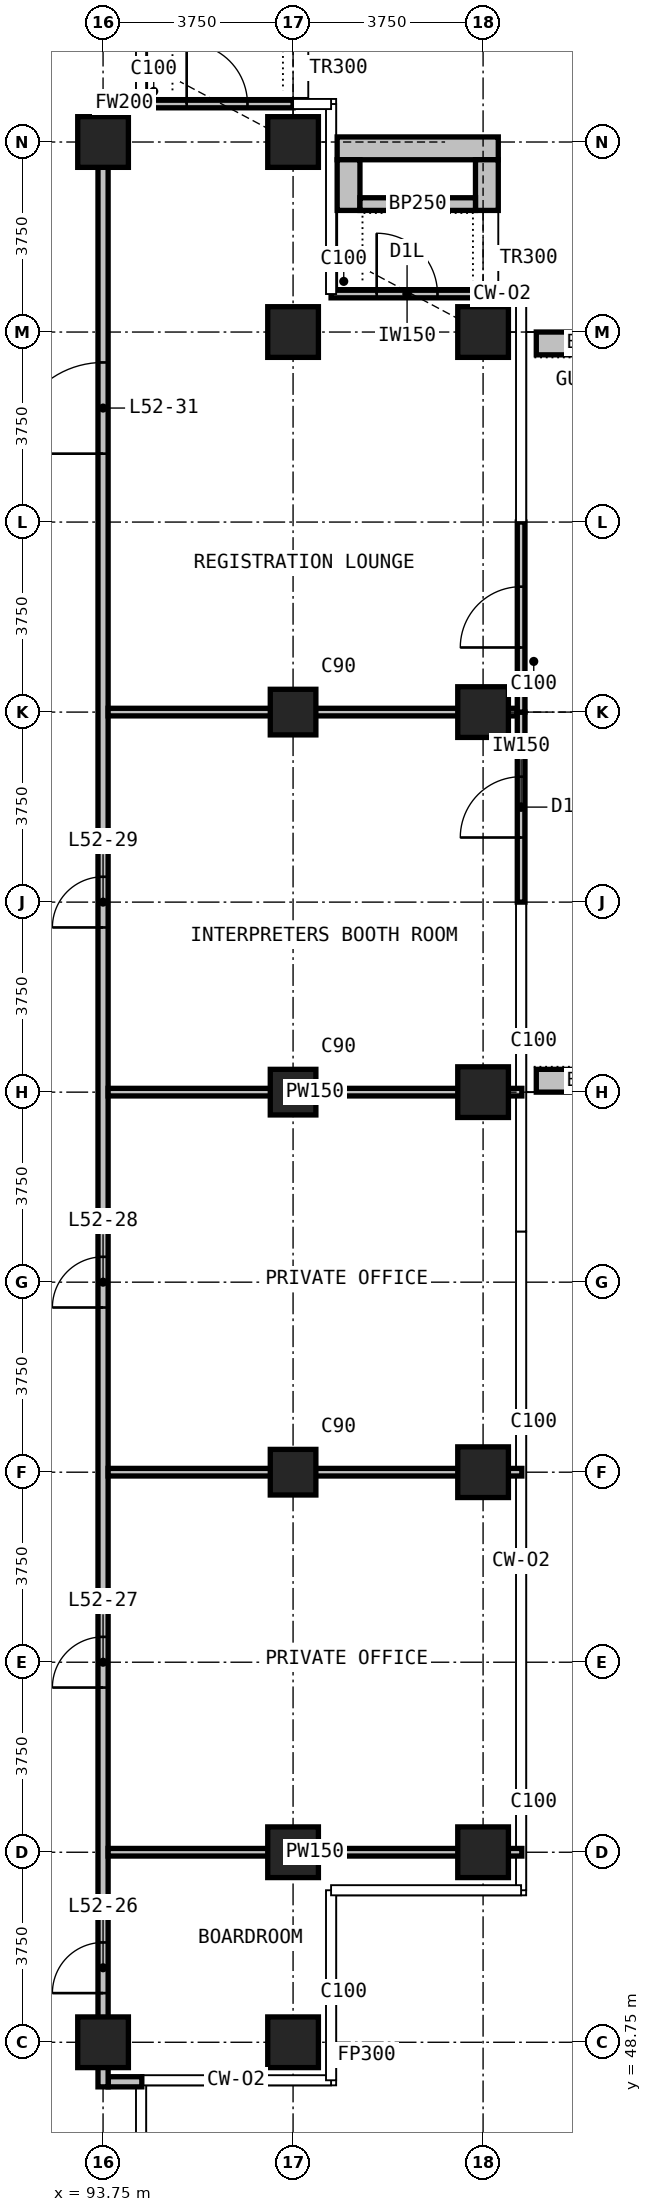
"""IFC4 building model, lengths in metres.
Left out: names, types, materials, properties, quantities, classifications, styles, units other than length and angle.
Written with IfcOpenShell. Run it as: python <this file> out.ifc"""

import sys

from ifc_helpers import new_model, si_unit, direction, frame, frame_2d, origin, origin_2d, place, context, subcontext, project, spatial, rectangle, extrude, element, fill, save


model = new_model("IFC4")
c1 = context("Model", 3, precision=1e-05, world=origin(), true_north=direction((0.0, 1.0)))
c2 = subcontext(c1, "Body", "Model", "MODEL_VIEW")
j1 = project(units=[si_unit("LENGTHUNIT", "METRE"), si_unit("PLANEANGLEUNIT", "RADIAN")], contexts=[c1])
p1 = place(None, origin())
s1 = spatial("IfcSite", under=j1, at=p1, CompositionType="ELEMENT")
p2 = place(p1, origin())
s2 = spatial("IfcBuilding", under=s1, at=p2, CompositionType="ELEMENT")
p3 = place(p2, frame((0.0, 0.0, 203.1)))
s3 = spatial("IfcBuildingStorey", under=s2, at=p3, CompositionType="ELEMENT", Elevation=203.1)
for number, where, z_axis, x_axis in (
    (1, (93.75, 48.75, 0.0), (0.0, 0.0, 1.0), (1.0, 0.0, 0.0)),
    (2, (93.75, 86.25, 0.0), (0.0, 0.0, 1.0), (1.0, 0.0, 0.0)),
    (3, (97.5, 48.75, 0.0), (0.0, 0.0, 1.0), (1.0, 0.0, 0.0)),
    (4, (97.5, 52.5, 0.0), (0.0, 0.0, 1.0), (1.0, 0.0, 0.0)),
):
    element("IfcColumn", number, at=place(p3, frame(where, z_axis=z_axis, x_axis=x_axis)), inside=s3, PredefinedType="COLUMN", context=c2, shape_type="SweptSolid", body=[
        extrude(rectangle(XDim=1.0, YDim=1.0, at=origin_2d()), origin(), (0.0, 0.0, 1.0), 3.6),
    ])
for number, where, z_axis, x_axis in (
    (5, (97.5, 60.0, 0.0), (0.0, 0.0, 1.0), (1.0, 0.0, 0.0)),
    (6, (97.5, 67.5, 0.0), (0.0, 0.0, 1.0), (1.0, 0.0, 0.0)),
    (7, (97.5, 75.0, 0.0), (0.0, 0.0, 1.0), (1.0, 0.0, 0.0)),
):
    element("IfcColumn", number, at=place(p3, frame(where, z_axis=z_axis, x_axis=x_axis)), inside=s3, PredefinedType="COLUMN", context=c2, shape_type="SweptSolid", body=[
        extrude(rectangle(XDim=0.9, YDim=0.9, at=origin_2d()), origin(), (0.0, 0.0, 1.0), 3.6),
    ])
for number, where, z_axis, x_axis in (
    (8, (97.5, 82.5, 0.0), (0.0, 0.0, 1.0), (1.0, 0.0, 0.0)),
    (9, (97.5, 86.25, 0.0), (0.0, 0.0, 1.0), (1.0, 0.0, 0.0)),
    (10, (101.25, 52.5, 0.0), (0.0, 0.0, 1.0), (1.0, 0.0, 0.0)),
    (11, (101.25, 60.0, 0.0), (0.0, 0.0, 1.0), (1.0, 0.0, 0.0)),
    (12, (101.25, 67.5, 0.0), (0.0, 0.0, 1.0), (1.0, 0.0, 0.0)),
    (13, (101.25, 75.0, 0.0), (0.0, 0.0, 1.0), (1.0, 0.0, 0.0)),
    (14, (101.25, 82.5, 0.0), (0.0, 0.0, 1.0), (1.0, 0.0, 0.0)),
):
    element("IfcColumn", number, at=place(p3, frame(where, z_axis=z_axis, x_axis=x_axis)), inside=s3, PredefinedType="COLUMN", context=c2, shape_type="SweptSolid", body=[
        extrude(rectangle(XDim=1.0, YDim=1.0, at=origin_2d()), origin(), (0.0, 0.0, 1.0), 3.6),
    ])
p4 = place(p3, frame((102.0, 71.25, 0.0), z_axis=(0.0, 0.0, 1.0), x_axis=(0.0, 1.0, 0.0)))
e15 = element("IfcWall", 15, at=p4, inside=s3, PredefinedType="SOLIDWALL", context=c2, shape_type="SweptSolid", body=[
    extrude(rectangle(XDim=3.75, YDim=0.15, at=frame_2d((1.875, 0.0))), origin(), (0.0, 0.0, 1.0), 3.3),
])
p5 = place(p4, frame((1.275, 0.0, 0.0)))
e16 = element("IfcOpeningElement", 16, at=p5, cuts=e15, PredefinedType="OPENING", context=c2, shape_type="SweptSolid", body=[
    extrude(rectangle(XDim=1.2, YDim=2.4, at=frame_2d((0.6, 1.2))), frame((0.0, 0.085, 0.0), z_axis=(0.0, -1.0, 0.0), x_axis=(1.0, 0.0, 0.0)), (0.0, 0.0, 1.0), 0.17),
])
p6 = place(p3, frame((102.0, 75.0, 0.0), z_axis=(0.0, 0.0, 1.0), x_axis=(0.0, 1.0, 0.0)))
e17 = element("IfcWall", 17, at=p6, inside=s3, PredefinedType="SOLIDWALL", context=c2, shape_type="SweptSolid", body=[
    extrude(rectangle(XDim=3.75, YDim=0.15, at=frame_2d((1.875, 0.0))), origin(), (0.0, 0.0, 1.0), 3.3),
])
p7 = place(p6, frame((1.275, 0.0, 0.0)))
e18 = element("IfcOpeningElement", 18, at=p7, cuts=e17, PredefinedType="OPENING", context=c2, shape_type="SweptSolid", body=[
    extrude(rectangle(XDim=1.2, YDim=2.4, at=frame_2d((0.6, 1.2))), frame((0.0, 0.085, 0.0), z_axis=(0.0, -1.0, 0.0), x_axis=(1.0, 0.0, 0.0)), (0.0, 0.0, 1.0), 0.17),
])
p8 = place(p3, frame((98.25, 83.25, 0.0), z_axis=(0.0, 0.0, 1.0), x_axis=(1.0, 0.0, 0.0)))
e19 = element("IfcWall", 19, at=p8, inside=s3, PredefinedType="SOLIDWALL", context=c2, shape_type="SweptSolid", body=[
    extrude(rectangle(XDim=3.0, YDim=0.15, at=frame_2d((1.5, 0.0))), origin(), (0.0, 0.0, 1.0), 3.3),
])
p9 = place(p8, frame((0.9, 0.0, 0.0)))
e20 = element("IfcOpeningElement", 20, at=p9, cuts=e19, PredefinedType="OPENING", context=c2, shape_type="SweptSolid", body=[
    extrude(rectangle(XDim=1.2, YDim=2.0, at=frame_2d((0.6, 1.0))), frame((0.0, 0.085, 0.0), z_axis=(0.0, -1.0, 0.0), x_axis=(1.0, 0.0, 0.0)), (0.0, 0.0, 1.0), 0.17),
])
p10 = place(p3, frame((94.5, 87.0, 0.0), z_axis=(0.0, 0.0, 1.0), x_axis=(1.0, 0.0, 0.0)))
e21 = element("IfcWall", 21, at=p10, inside=s3, PredefinedType="SOLIDWALL", context=c2, shape_type="SweptSolid", body=[
    extrude(rectangle(XDim=3.0, YDim=0.15, at=frame_2d((1.5, 0.0))), origin(), (0.0, 0.0, 1.0), 3.3),
])
p11 = place(p10, frame((0.9, 0.0, 0.0)))
e22 = element("IfcOpeningElement", 22, at=p11, cuts=e21, PredefinedType="OPENING", context=c2, shape_type="SweptSolid", body=[
    extrude(rectangle(XDim=1.2, YDim=2.0, at=frame_2d((0.6, 1.0))), frame((0.0, 0.085, 0.0), z_axis=(0.0, -1.0, 0.0), x_axis=(1.0, 0.0, 0.0)), (0.0, 0.0, 1.0), 0.17),
])
for number, where, z_axis, x_axis in (
    (23, (102.3, 67.725, 0.0), (0.0, 0.0, 1.0), (1.0, 0.0, 0.0)),
    (24, (102.3, 82.275, 0.0), (0.0, 0.0, 1.0), (1.0, 0.0, 0.0)),
):
    element("IfcWall", number, at=place(p3, frame(where, z_axis=z_axis, x_axis=x_axis)), inside=s3, PredefinedType="USERDEFINED", context=c2, shape_type="SweptSolid", body=[
        extrude(rectangle(XDim=2.35, YDim=0.45, at=frame_2d((1.175, 0.0))), origin(), (0.0, 0.0, 1.0), 1.1),
    ])
p12 = place(p3, frame((98.37, 86.125, 0.0), z_axis=(0.0, 0.0, 1.0), x_axis=(1.0, 0.0, 0.0)))
e25 = element("IfcWall", 25, at=p12, inside=s3, PredefinedType="USERDEFINED", context=c2, shape_type="SweptSolid", body=[
    extrude(rectangle(XDim=3.18, YDim=0.45, at=frame_2d((1.59, 0.0))), origin(), (0.0, 0.0, 1.0), 1.1),
])
for number, where, z_axis, x_axis in (
    (26, (98.595, 84.9, 0.0), (0.0, 0.0, 1.0), (0.0, 1.0, 0.0)),
    (27, (101.325, 84.9, 0.0), (0.0, 0.0, 1.0), (0.0, 1.0, 0.0)),
):
    element("IfcWall", number, at=place(p3, frame(where, z_axis=z_axis, x_axis=x_axis)), inside=s3, PredefinedType="USERDEFINED", context=c2, shape_type="SweptSolid", body=[
        extrude(rectangle(XDim=1.0, YDim=0.45, at=frame_2d((0.5, 0.0))), origin(), (0.0, 0.0, 1.0), 1.1),
    ])
p13 = place(p3, frame((98.82, 85.025, 0.0), z_axis=(0.0, 0.0, 1.0), x_axis=(1.0, 0.0, 0.0)))
e28 = element("IfcWall", 28, at=p13, inside=s3, PredefinedType="USERDEFINED", context=c2, shape_type="SweptSolid", body=[
    extrude(rectangle(XDim=2.28, YDim=0.25, at=frame_2d((1.14, 0.0))), origin(), (0.0, 0.0, 1.0), 1.0),
])
p14 = place(p3, frame((93.85, 47.97, 0.0), z_axis=(0.0, 0.0, 1.0), x_axis=(1.0, 0.0, 0.0)))
e29 = element("IfcWall", 29, at=p14, inside=s3, PredefinedType="PARTITIONING", context=c2, shape_type="SweptSolid", body=[
    extrude(rectangle(XDim=0.665, YDim=0.2, at=frame_2d((0.333, 0.0))), origin(), (0.0, 0.0, 1.0), 3.3),
])
p15 = place(p3, frame((93.85, 87.03, 0.0), z_axis=(0.0, 0.0, 1.0), x_axis=(1.0, 0.0, 0.0)))
e30 = element("IfcWall", 30, at=p15, inside=s3, PredefinedType="PARTITIONING", context=c2, shape_type="SweptSolid", body=[
    extrude(rectangle(XDim=0.64, YDim=0.2, at=frame_2d((0.32, 0.0))), origin(), (0.0, 0.0, 1.0), 3.3),
])
p16 = place(p3, frame((93.75, 47.87, 0.0), z_axis=(0.0, 0.0, 1.0), x_axis=(0.0, 1.0, 0.0)))
e31 = element("IfcWall", 31, at=p16, inside=s3, PredefinedType="PARTITIONING", context=c2, shape_type="SweptSolid", body=[
    extrude(rectangle(XDim=39.26, YDim=0.2, at=frame_2d((19.63, 0.0))), origin(), (0.0, 0.0, 1.0), 3.3),
])
p17 = place(p16, frame((1.85, 0.0, 0.0)))
e32 = element("IfcOpeningElement", 32, at=p17, cuts=e31, PredefinedType="OPENING", context=c2, shape_type="SweptSolid", body=[
    extrude(rectangle(XDim=1.0, YDim=2.2, at=frame_2d((0.5, 1.1))), frame((0.0, 0.11, 0.0), z_axis=(0.0, -1.0, 0.0), x_axis=(1.0, 0.0, 0.0)), (0.0, 0.0, 1.0), 0.22),
])
p18 = place(p16, frame((7.88, 0.0, 0.0)))
e33 = element("IfcOpeningElement", 33, at=p18, cuts=e31, PredefinedType="OPENING", context=c2, shape_type="SweptSolid", body=[
    extrude(rectangle(XDim=1.0, YDim=2.2, at=frame_2d((0.5, 1.1))), frame((0.0, 0.11, 0.0), z_axis=(0.0, -1.0, 0.0), x_axis=(1.0, 0.0, 0.0)), (0.0, 0.0, 1.0), 0.22),
])
p19 = place(p16, frame((15.38, 0.0, 0.0)))
e34 = element("IfcOpeningElement", 34, at=p19, cuts=e31, PredefinedType="OPENING", context=c2, shape_type="SweptSolid", body=[
    extrude(rectangle(XDim=1.0, YDim=2.2, at=frame_2d((0.5, 1.1))), frame((0.0, 0.11, 0.0), z_axis=(0.0, -1.0, 0.0), x_axis=(1.0, 0.0, 0.0)), (0.0, 0.0, 1.0), 0.22),
])
p20 = place(p16, frame((22.88, 0.0, 0.0)))
e35 = element("IfcOpeningElement", 35, at=p20, cuts=e31, PredefinedType="OPENING", context=c2, shape_type="SweptSolid", body=[
    extrude(rectangle(XDim=1.0, YDim=2.2, at=frame_2d((0.5, 1.1))), frame((0.0, 0.11, 0.0), z_axis=(0.0, -1.0, 0.0), x_axis=(1.0, 0.0, 0.0)), (0.0, 0.0, 1.0), 0.22),
])
p21 = place(p16, frame((32.23, 0.0, 0.0)))
e36 = element("IfcOpeningElement", 36, at=p21, cuts=e31, PredefinedType="OPENING", context=c2, shape_type="SweptSolid", body=[
    extrude(rectangle(XDim=1.8, YDim=2.2, at=frame_2d((0.9, 1.1))), frame((0.0, 0.11, 0.0), z_axis=(0.0, -1.0, 0.0), x_axis=(1.0, 0.0, 0.0)), (0.0, 0.0, 1.0), 0.22),
])
for number, where, z_axis, x_axis in (
    (37, (93.85, 52.5, 0.0), (0.0, 0.0, 1.0), (1.0, 0.0, 0.0)),
    (38, (93.85, 60.0, 0.0), (0.0, 0.0, 1.0), (1.0, 0.0, 0.0)),
    (39, (93.85, 67.5, 0.0), (0.0, 0.0, 1.0), (1.0, 0.0, 0.0)),
):
    element("IfcWall", number, at=place(p3, frame(where, z_axis=z_axis, x_axis=x_axis)), inside=s3, PredefinedType="PARTITIONING", context=c2, shape_type="SweptSolid", body=[
        extrude(rectangle(XDim=8.165, YDim=0.15, at=frame_2d((4.083, 0.0))), origin(), (0.0, 0.0, 1.0), 3.3),
    ])
p22 = place(p3, frame((93.85, 75.0, 0.0), z_axis=(0.0, 0.0, 1.0), x_axis=(1.0, 0.0, 0.0)))
e40 = element("IfcWall", 40, at=p22, inside=s3, PredefinedType="PARTITIONING", context=c2, shape_type="SweptSolid", body=[
    extrude(rectangle(XDim=8.065, YDim=0.15, at=frame_2d((4.032, 0.0))), origin(), (0.0, 0.0, 1.0), 3.3),
])
p23 = place(p5, origin())
e41 = element("IfcDoor", 41, at=p23, inside=s3, OperationType="SINGLE_SWING_LEFT", PredefinedType="DOOR", context=c2, shape_type="SweptSolid", body=[
    extrude(rectangle(XDim=1.2, YDim=2.4, at=frame_2d((0.6, 1.2))), frame((0.0, 0.025, 0.0), z_axis=(0.0, -1.0, 0.0), x_axis=(1.0, 0.0, 0.0)), (0.0, 0.0, 1.0), 0.05),
])
fill(e16, e41)
p24 = place(p7, origin())
e42 = element("IfcDoor", 42, at=p24, inside=s3, OperationType="SINGLE_SWING_LEFT", PredefinedType="DOOR", context=c2, shape_type="SweptSolid", body=[
    extrude(rectangle(XDim=1.2, YDim=2.4, at=frame_2d((0.6, 1.2))), frame((0.0, 0.025, 0.0), z_axis=(0.0, -1.0, 0.0), x_axis=(1.0, 0.0, 0.0)), (0.0, 0.0, 1.0), 0.05),
])
fill(e18, e42)
p25 = place(p9, origin())
e43 = element("IfcDoor", 43, at=p25, inside=s3, OperationType="SINGLE_SWING_LEFT", PredefinedType="DOOR", context=c2, shape_type="SweptSolid", body=[
    extrude(rectangle(XDim=1.2, YDim=2.0, at=frame_2d((0.6, 1.0))), frame((0.0, 0.025, 0.0), z_axis=(0.0, -1.0, 0.0), x_axis=(1.0, 0.0, 0.0)), (0.0, 0.0, 1.0), 0.05),
])
fill(e20, e43)
p26 = place(p11, origin())
e44 = element("IfcDoor", 44, at=p26, inside=s3, OperationType="SINGLE_SWING_LEFT", PredefinedType="DOOR", context=c2, shape_type="SweptSolid", body=[
    extrude(rectangle(XDim=1.2, YDim=2.0, at=frame_2d((0.6, 1.0))), frame((0.0, 0.025, 0.0), z_axis=(0.0, -1.0, 0.0), x_axis=(1.0, 0.0, 0.0)), (0.0, 0.0, 1.0), 0.05),
])
fill(e22, e44)
p27 = place(p17, origin())
e45 = element("IfcDoor", 45, at=p27, inside=s3, OperationType="SINGLE_SWING_LEFT", PredefinedType="DOOR", context=c2, shape_type="SweptSolid", body=[
    extrude(rectangle(XDim=1.0, YDim=2.2, at=frame_2d((0.5, 1.1))), frame((0.0, 0.025, 0.0), z_axis=(0.0, -1.0, 0.0), x_axis=(1.0, 0.0, 0.0)), (0.0, 0.0, 1.0), 0.05),
])
fill(e32, e45)
p28 = place(p18, origin())
e46 = element("IfcDoor", 46, at=p28, inside=s3, OperationType="SINGLE_SWING_LEFT", PredefinedType="DOOR", context=c2, shape_type="SweptSolid", body=[
    extrude(rectangle(XDim=1.0, YDim=2.2, at=frame_2d((0.5, 1.1))), frame((0.0, 0.025, 0.0), z_axis=(0.0, -1.0, 0.0), x_axis=(1.0, 0.0, 0.0)), (0.0, 0.0, 1.0), 0.05),
])
fill(e33, e46)
p29 = place(p19, origin())
e47 = element("IfcDoor", 47, at=p29, inside=s3, OperationType="SINGLE_SWING_LEFT", PredefinedType="DOOR", context=c2, shape_type="SweptSolid", body=[
    extrude(rectangle(XDim=1.0, YDim=2.2, at=frame_2d((0.5, 1.1))), frame((0.0, 0.025, 0.0), z_axis=(0.0, -1.0, 0.0), x_axis=(1.0, 0.0, 0.0)), (0.0, 0.0, 1.0), 0.05),
])
fill(e34, e47)
p30 = place(p20, origin())
e48 = element("IfcDoor", 48, at=p30, inside=s3, OperationType="SINGLE_SWING_LEFT", PredefinedType="DOOR", context=c2, shape_type="SweptSolid", body=[
    extrude(rectangle(XDim=1.0, YDim=2.2, at=frame_2d((0.5, 1.1))), frame((0.0, 0.025, 0.0), z_axis=(0.0, -1.0, 0.0), x_axis=(1.0, 0.0, 0.0)), (0.0, 0.0, 1.0), 0.05),
])
fill(e35, e48)
p31 = place(p21, origin())
e49 = element("IfcDoor", 49, at=p31, inside=s3, OperationType="DOUBLE_DOOR_SINGLE_SWING", PredefinedType="DOOR", context=c2, shape_type="SweptSolid", body=[
    extrude(rectangle(XDim=1.8, YDim=2.2, at=frame_2d((0.9, 1.1))), frame((0.0, 0.025, 0.0), z_axis=(0.0, -1.0, 0.0), x_axis=(1.0, 0.0, 0.0)), (0.0, 0.0, 1.0), 0.05),
])
fill(e36, e49)
save(model, sys.argv[1])
